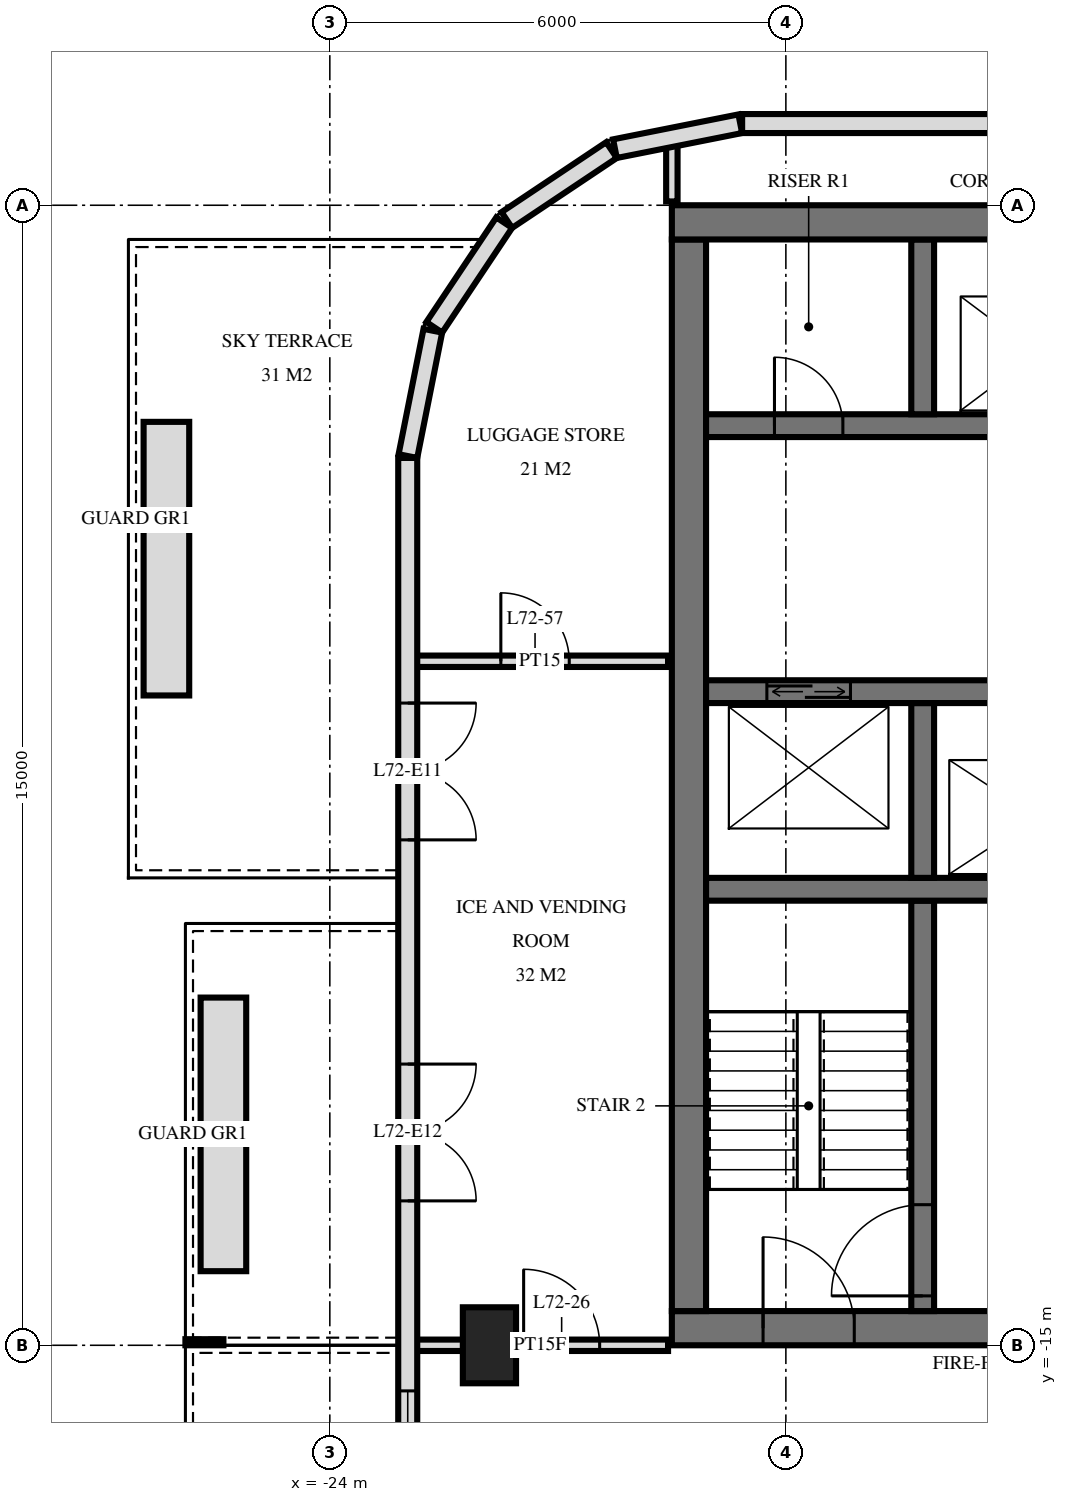
"""IFC4 building model, lengths in metres.
Left out: names, types, materials, properties, quantities, classifications, styles, units other than length and angle.
Written with IfcOpenShell. Run it as: python <this file> out.ifc"""

import sys

from ifc_helpers import new_model, si_unit, direction, frame, frame_2d, origin, origin_2d, place, context, subcontext, project, spatial, rectangle, extrude, element, fill, save


model = new_model("IFC4")
c1 = context("Model", 3, precision=1e-05, world=origin(), true_north=direction((0.0, 1.0)))
c2 = subcontext(c1, "Body", "Model", "MODEL_VIEW")
j1 = project(units=[si_unit("LENGTHUNIT", "METRE"), si_unit("PLANEANGLEUNIT", "RADIAN")], contexts=[c1])
p1 = place(None, origin())
s1 = spatial("IfcSite", under=j1, at=p1, CompositionType="ELEMENT")
p2 = place(p1, origin())
s2 = spatial("IfcBuilding", under=s1, at=p2, CompositionType="ELEMENT")
p3 = place(p2, frame((0.0, 0.0, 273.6)))
s3 = spatial("IfcBuildingStorey", under=s2, at=p3, CompositionType="ELEMENT", Elevation=273.6)
p4 = place(p3, frame((-21.9, -15.0, 0.0), z_axis=(0.0, 0.0, 1.0), x_axis=(0.0, 1.0, 0.0)))
e1 = element("IfcColumn", 1, at=p4, inside=s3, PredefinedType="COLUMN", context=c2, shape_type="SweptSolid", body=[
    extrude(rectangle(XDim=1.0, YDim=0.7, at=origin_2d()), origin(), (0.0, 0.0, 1.0), 3.5),
])
p5 = place(p3, frame((-19.5, -0.225, 0.0), z_axis=(0.0, 0.0, 1.0), x_axis=(1.0, 0.0, 0.0)))
e2 = element("IfcWall", 2, at=p5, inside=s3, PredefinedType="SHEAR", context=c2, shape_type="SweptSolid", body=[
    extrude(rectangle(XDim=9.5, YDim=0.45, at=frame_2d((4.75, 0.0))), origin(), (0.0, 0.0, 1.0), 3.5),
])
p6 = place(p3, frame((-19.5, -14.775, 0.0), z_axis=(0.0, 0.0, 1.0), x_axis=(1.0, 0.0, 0.0)))
e3 = element("IfcWall", 3, at=p6, inside=s3, PredefinedType="SHEAR", context=c2, shape_type="SweptSolid", body=[
    extrude(rectangle(XDim=9.5, YDim=0.45, at=frame_2d((4.75, 0.0))), origin(), (0.0, 0.0, 1.0), 3.5),
])
p7 = place(p6, frame((1.2, 0.0, 0.0)))
e4 = element("IfcOpeningElement", 4, at=p7, cuts=e3, PredefinedType="OPENING", context=c2, shape_type="SweptSolid", body=[
    extrude(rectangle(XDim=1.2, YDim=2.1, at=frame_2d((0.6, 1.05))), frame((0.0, 0.235, 0.0), z_axis=(0.0, -1.0, 0.0), x_axis=(1.0, 0.0, 0.0)), (0.0, 0.0, 1.0), 0.47),
])
p8 = place(p6, frame((4.25, 0.0, 0.0)))
e5 = element("IfcOpeningElement", 5, at=p8, cuts=e3, PredefinedType="OPENING", context=c2, shape_type="SweptSolid", body=[
    extrude(rectangle(XDim=1.1, YDim=2.1, at=frame_2d((0.55, 1.05))), frame((0.0, 0.235, 0.0), z_axis=(0.0, -1.0, 0.0), x_axis=(1.0, 0.0, 0.0)), (0.0, 0.0, 1.0), 0.47),
])
p9 = place(p3, frame((-19.275, -14.55, 0.0), z_axis=(0.0, 0.0, 1.0), x_axis=(0.0, 1.0, 0.0)))
e6 = element("IfcWall", 6, at=p9, inside=s3, PredefinedType="SHEAR", context=c2, shape_type="SweptSolid", body=[
    extrude(rectangle(XDim=14.1, YDim=0.45, at=frame_2d((7.05, 0.0))), origin(), (0.0, 0.0, 1.0), 3.5),
])
p10 = place(p3, frame((-19.05, -2.9, 0.0), z_axis=(0.0, 0.0, 1.0), x_axis=(1.0, 0.0, 0.0)))
e7 = element("IfcWall", 7, at=p10, inside=s3, PredefinedType="SHEAR", context=c2, shape_type="SweptSolid", body=[
    extrude(rectangle(XDim=8.7, YDim=0.3, at=frame_2d((4.35, 0.0))), origin(), (0.0, 0.0, 1.0), 3.5),
])
p11 = place(p10, frame((6.8, 0.0, 0.0)))
e8 = element("IfcOpeningElement", 8, at=p11, cuts=e7, PredefinedType="OPENING", context=c2, shape_type="SweptSolid", body=[
    extrude(rectangle(XDim=1.1, YDim=2.1, at=frame_2d((0.55, 1.05))), frame((0.0, 0.16, 0.0), z_axis=(0.0, -1.0, 0.0), x_axis=(1.0, 0.0, 0.0)), (0.0, 0.0, 1.0), 0.32),
])
p12 = place(p10, frame((3.8, 0.0, 0.0)))
e9 = element("IfcOpeningElement", 9, at=p12, cuts=e7, PredefinedType="OPENING", context=c2, shape_type="SweptSolid", body=[
    extrude(rectangle(XDim=1.1, YDim=2.1, at=frame_2d((0.55, 1.05))), frame((0.0, 0.16, 0.0), z_axis=(0.0, -1.0, 0.0), x_axis=(1.0, 0.0, 0.0)), (0.0, 0.0, 1.0), 0.32),
])
p13 = place(p10, frame((0.9, 0.0, 0.0)))
e10 = element("IfcOpeningElement", 10, at=p13, cuts=e7, PredefinedType="OPENING", context=c2, shape_type="SweptSolid", body=[
    extrude(rectangle(XDim=0.9, YDim=2.1, at=frame_2d((0.45, 1.05))), frame((0.0, 0.16, 0.0), z_axis=(0.0, -1.0, 0.0), x_axis=(1.0, 0.0, 0.0)), (0.0, 0.0, 1.0), 0.32),
])
p14 = place(p3, frame((-19.05, -6.4, 0.0), z_axis=(0.0, 0.0, 1.0), x_axis=(1.0, 0.0, 0.0)))
e11 = element("IfcWall", 11, at=p14, inside=s3, PredefinedType="SHEAR", context=c2, shape_type="SweptSolid", body=[
    extrude(rectangle(XDim=8.7, YDim=0.3, at=frame_2d((4.35, 0.0))), origin(), (0.0, 0.0, 1.0), 3.5),
])
p15 = place(p14, frame((0.8, 0.0, 0.0)))
e12 = element("IfcOpeningElement", 12, at=p15, cuts=e11, PredefinedType="OPENING", context=c2, shape_type="SweptSolid", body=[
    extrude(rectangle(XDim=1.1, YDim=2.1, at=frame_2d((0.55, 1.05))), frame((0.0, 0.16, 0.0), z_axis=(0.0, -1.0, 0.0), x_axis=(1.0, 0.0, 0.0)), (0.0, 0.0, 1.0), 0.32),
])
p16 = place(p3, frame((-19.05, -9.0, 0.0), z_axis=(0.0, 0.0, 1.0), x_axis=(1.0, 0.0, 0.0)))
e13 = element("IfcWall", 13, at=p16, inside=s3, PredefinedType="SHEAR", context=c2, shape_type="SweptSolid", body=[
    extrude(rectangle(XDim=8.7, YDim=0.3, at=frame_2d((4.35, 0.0))), origin(), (0.0, 0.0, 1.0), 3.5),
])
p17 = place(p16, frame((3.8, 0.0, 0.0)))
e14 = element("IfcOpeningElement", 14, at=p17, cuts=e13, PredefinedType="OPENING", context=c2, shape_type="SweptSolid", body=[
    extrude(rectangle(XDim=1.1, YDim=2.1, at=frame_2d((0.55, 1.05))), frame((0.0, 0.16, 0.0), z_axis=(0.0, -1.0, 0.0), x_axis=(1.0, 0.0, 0.0)), (0.0, 0.0, 1.0), 0.32),
])
for number, where, z_axis, x_axis in (
    (15, (-16.2, -2.75, 0.0), (0.0, 0.0, 1.0), (0.0, 1.0, 0.0)),
    (16, (-16.2, -8.85, 0.0), (0.0, 0.0, 1.0), (0.0, 1.0, 0.0)),
):
    element("IfcWall", number, at=place(p3, frame(where, z_axis=z_axis, x_axis=x_axis)), inside=s3, PredefinedType="SHEAR", context=c2, shape_type="SweptSolid", body=[
        extrude(rectangle(XDim=2.3, YDim=0.3, at=frame_2d((1.15, 0.0))), origin(), (0.0, 0.0, 1.0), 3.5),
    ])
p18 = place(p3, frame((-16.2, -14.55, 0.0), z_axis=(0.0, 0.0, 1.0), x_axis=(0.0, 1.0, 0.0)))
e17 = element("IfcWall", 17, at=p18, inside=s3, PredefinedType="SHEAR", context=c2, shape_type="SweptSolid", body=[
    extrude(rectangle(XDim=5.4, YDim=0.3, at=frame_2d((2.7, 0.0))), origin(), (0.0, 0.0, 1.0), 3.5),
])
p19 = place(p18, frame((0.2, 0.0, 0.0)))
e18 = element("IfcOpeningElement", 18, at=p19, cuts=e17, PredefinedType="OPENING", context=c2, shape_type="SweptSolid", body=[
    extrude(rectangle(XDim=1.2, YDim=2.1, at=frame_2d((0.6, 1.05))), frame((0.0, 0.16, 0.0), z_axis=(0.0, -1.0, 0.0), x_axis=(1.0, 0.0, 0.0)), (0.0, 0.0, 1.0), 0.32),
])
p20 = place(p3, frame((18.575, 1.075, 0.0), z_axis=(0.0, 0.0, 1.0), x_axis=(-1.0, 0.0, 0.0)))
e19 = element("IfcWall", 19, at=p20, inside=s3, PredefinedType="SOLIDWALL", context=c2, shape_type="SweptSolid", body=[
    extrude(rectangle(XDim=37.151, YDim=0.25, at=frame_2d((18.575, 0.0))), origin(), (0.0, 0.0, 1.0), 3.22),
])
p21 = place(p20, frame((15.275, 0.0, 0.9)))
e20 = element("IfcOpeningElement", 20, at=p21, cuts=e19, PredefinedType="OPENING", context=c2, shape_type="SweptSolid", body=[
    extrude(rectangle(XDim=2.4, YDim=1.5, at=frame_2d((1.2, 0.75))), frame((0.0, 0.135, 0.0), z_axis=(0.0, -1.0, 0.0), x_axis=(1.0, 0.0, 0.0)), (0.0, 0.0, 1.0), 0.27),
])
p22 = place(p20, frame((21.275, 0.0, 0.9)))
e21 = element("IfcOpeningElement", 21, at=p22, cuts=e19, PredefinedType="OPENING", context=c2, shape_type="SweptSolid", body=[
    extrude(rectangle(XDim=2.4, YDim=1.5, at=frame_2d((1.2, 0.75))), frame((0.0, 0.135, 0.0), z_axis=(0.0, -1.0, 0.0), x_axis=(1.0, 0.0, 0.0)), (0.0, 0.0, 1.0), 0.27),
])
p23 = place(p20, frame((24.275, 0.0, 0.9)))
e22 = element("IfcOpeningElement", 22, at=p23, cuts=e19, PredefinedType="OPENING", context=c2, shape_type="SweptSolid", body=[
    extrude(rectangle(XDim=2.4, YDim=1.5, at=frame_2d((1.2, 0.75))), frame((0.0, 0.135, 0.0), z_axis=(0.0, -1.0, 0.0), x_axis=(1.0, 0.0, 0.0)), (0.0, 0.0, 1.0), 0.27),
])
p24 = place(p3, frame((-18.6, 1.073, 0.0), z_axis=(0.0, 0.0, 1.0), x_axis=(-0.980797896849, -0.195026884138, 0.0)))
e23 = element("IfcWall", 23, at=p24, inside=s3, PredefinedType="SOLIDWALL", context=c2, shape_type="SweptSolid", body=[
    extrude(rectangle(XDim=1.681, YDim=0.25, at=frame_2d((0.841, 0.0))), origin(), (0.0, 0.0, 1.0), 3.22),
])
for number, where, z_axis, x_axis in (
    (24, (-20.294, 0.726, 0.0), (0.0, 0.0, 1.0), (-0.831, -0.556, 0.0)),
    (25, (-21.706, -0.229, 0.0), (0.0, 0.0, 1.0), (-0.556, -0.831, 0.0)),
):
    element("IfcWall", number, at=place(p3, frame(where, z_axis=z_axis, x_axis=x_axis)), inside=s3, PredefinedType="SOLIDWALL", context=c2, shape_type="SweptSolid", body=[
        extrude(rectangle(XDim=1.656, YDim=0.25, at=frame_2d((0.828, 0.0))), origin(), (0.0, 0.0, 1.0), 3.22),
    ])
p25 = place(p3, frame((-22.645, -1.651, 0.0), z_axis=(0.0, 0.0, 1.0), x_axis=(-0.19513878023, -0.980775640221, 0.0)))
e26 = element("IfcWall", 26, at=p25, inside=s3, PredefinedType="SOLIDWALL", context=c2, shape_type="SweptSolid", body=[
    extrude(rectangle(XDim=1.681, YDim=0.25, at=frame_2d((0.841, 0.0))), origin(), (0.0, 0.0, 1.0), 3.22),
])
p26 = place(p3, frame((-22.975, -3.325, 0.0), z_axis=(0.0, 0.0, 1.0), x_axis=(0.0, -1.0, 0.0)))
e27 = element("IfcWall", 27, at=p26, inside=s3, PredefinedType="SOLIDWALL", context=c2, shape_type="SweptSolid", body=[
    extrude(rectangle(XDim=25.951, YDim=0.25, at=frame_2d((12.975, 0.0))), origin(), (0.0, 0.0, 1.0), 3.22),
])
p27 = place(p26, frame((3.225, 0.0, 0.0)))
e28 = element("IfcOpeningElement", 28, at=p27, cuts=e27, PredefinedType="OPENING", context=c2, shape_type="SweptSolid", body=[
    extrude(rectangle(XDim=1.8, YDim=2.4, at=frame_2d((0.9, 1.2))), frame((0.0, 0.135, 0.0), z_axis=(0.0, -1.0, 0.0), x_axis=(1.0, 0.0, 0.0)), (0.0, 0.0, 1.0), 0.27),
])
p28 = place(p26, frame((7.975, 0.0, 0.0)))
e29 = element("IfcOpeningElement", 29, at=p28, cuts=e27, PredefinedType="OPENING", context=c2, shape_type="SweptSolid", body=[
    extrude(rectangle(XDim=1.8, YDim=2.4, at=frame_2d((0.9, 1.2))), frame((0.0, 0.135, 0.0), z_axis=(0.0, -1.0, 0.0), x_axis=(1.0, 0.0, 0.0)), (0.0, 0.0, 1.0), 0.27),
])
p29 = place(p26, frame((12.275, 0.0, 0.9)))
e30 = element("IfcOpeningElement", 30, at=p29, cuts=e27, PredefinedType="OPENING", context=c2, shape_type="SweptSolid", body=[
    extrude(rectangle(XDim=1.2, YDim=1.5, at=frame_2d((0.6, 0.75))), frame((0.0, 0.135, 0.0), z_axis=(0.0, -1.0, 0.0), x_axis=(1.0, 0.0, 0.0)), (0.0, 0.0, 1.0), 0.27),
])
p30 = place(p26, frame((18.175, 0.0, 0.0)))
e31 = element("IfcOpeningElement", 31, at=p30, cuts=e27, PredefinedType="OPENING", context=c2, shape_type="SweptSolid", body=[
    extrude(rectangle(XDim=1.8, YDim=2.4, at=frame_2d((0.9, 1.2))), frame((0.0, 0.135, 0.0), z_axis=(0.0, -1.0, 0.0), x_axis=(1.0, 0.0, 0.0)), (0.0, 0.0, 1.0), 0.27),
])
p31 = place(p26, frame((21.075, 0.0, 0.0)))
e32 = element("IfcOpeningElement", 32, at=p31, cuts=e27, PredefinedType="OPENING", context=c2, shape_type="SweptSolid", body=[
    extrude(rectangle(XDim=1.8, YDim=2.4, at=frame_2d((0.9, 1.2))), frame((0.0, 0.135, 0.0), z_axis=(0.0, -1.0, 0.0), x_axis=(1.0, 0.0, 0.0)), (0.0, 0.0, 1.0), 0.27),
])
p32 = place(p26, frame((23.825, 0.0, 0.9)))
e33 = element("IfcOpeningElement", 33, at=p32, cuts=e27, PredefinedType="OPENING", context=c2, shape_type="SweptSolid", body=[
    extrude(rectangle(XDim=1.8, YDim=1.5, at=frame_2d((0.9, 0.75))), frame((0.0, 0.135, 0.0), z_axis=(0.0, -1.0, 0.0), x_axis=(1.0, 0.0, 0.0)), (0.0, 0.0, 1.0), 0.27),
])
for number, where, z_axis, x_axis in (
    (34, (-25.4, -14.025, 0.0), (0.0, 0.0, 1.0), (0.0, 1.0, 0.0)),
    (35, (-26.15, -6.45, 0.0), (0.0, 0.0, 1.0), (0.0, 1.0, 0.0)),
):
    element("IfcWall", number, at=place(p3, frame(where, z_axis=z_axis, x_axis=x_axis)), inside=s3, PredefinedType="USERDEFINED", context=c2, shape_type="SweptSolid", body=[
        extrude(rectangle(XDim=3.6, YDim=0.6, at=frame_2d((1.8, 0.0))), origin(), (0.0, 0.0, 1.0), 0.65),
    ])
p33 = place(p3, frame((-19.5, 0.05, 0.0), z_axis=(0.0, 0.0, 1.0), x_axis=(0.0, 1.0, 0.0)))
e36 = element("IfcWall", 36, at=p33, inside=s3, PredefinedType="PARTITIONING", context=c2, shape_type="SweptSolid", body=[
    extrude(rectangle(XDim=0.787, YDim=0.15, at=frame_2d((0.394, 0.0))), origin(), (0.0, 0.0, 1.0), 3.22),
])
p34 = place(p3, frame((-22.92, -15.0, 0.0), z_axis=(0.0, 0.0, 1.0), x_axis=(1.0, 0.0, 0.0)))
e37 = element("IfcWall", 37, at=p34, inside=s3, PredefinedType="PARTITIONING", context=c2, shape_type="SweptSolid", body=[
    extrude(rectangle(XDim=3.37, YDim=0.15, at=frame_2d((1.685, 0.0))), origin(), (0.0, 0.0, 1.0), 3.22),
])
p35 = place(p34, frame((1.47, 0.0, 0.0)))
e38 = element("IfcOpeningElement", 38, at=p35, cuts=e37, PredefinedType="OPENING", context=c2, shape_type="SweptSolid", body=[
    extrude(rectangle(XDim=1.0, YDim=2.1, at=frame_2d((0.5, 1.05))), frame((0.0, 0.085, 0.0), z_axis=(0.0, -1.0, 0.0), x_axis=(1.0, 0.0, 0.0)), (0.0, 0.0, 1.0), 0.17),
])
p36 = place(p3, frame((-22.92, -6.0, 0.0), z_axis=(0.0, 0.0, 1.0), x_axis=(1.0, 0.0, 0.0)))
e39 = element("IfcWall", 39, at=p36, inside=s3, PredefinedType="PARTITIONING", context=c2, shape_type="SweptSolid", body=[
    extrude(rectangle(XDim=3.37, YDim=0.15, at=frame_2d((1.685, 0.0))), origin(), (0.0, 0.0, 1.0), 3.22),
])
p37 = place(p36, frame((1.17, 0.0, 0.0)))
e40 = element("IfcOpeningElement", 40, at=p37, cuts=e39, PredefinedType="OPENING", context=c2, shape_type="SweptSolid", body=[
    extrude(rectangle(XDim=0.9, YDim=2.1, at=frame_2d((0.45, 1.05))), frame((0.0, 0.085, 0.0), z_axis=(0.0, -1.0, 0.0), x_axis=(1.0, 0.0, 0.0)), (0.0, 0.0, 1.0), 0.17),
])
p38 = place(p27, origin())
e41 = element("IfcDoor", 41, at=p38, inside=s3, OperationType="DOUBLE_DOOR_SINGLE_SWING", PredefinedType="DOOR", context=c2, shape_type="SweptSolid", body=[
    extrude(rectangle(XDim=1.8, YDim=2.4, at=frame_2d((0.9, 1.2))), frame((0.0, 0.025, 0.0), z_axis=(0.0, -1.0, 0.0), x_axis=(1.0, 0.0, 0.0)), (0.0, 0.0, 1.0), 0.05),
])
fill(e28, e41)
p39 = place(p28, origin())
e42 = element("IfcDoor", 42, at=p39, inside=s3, OperationType="DOUBLE_DOOR_SINGLE_SWING", PredefinedType="DOOR", context=c2, shape_type="SweptSolid", body=[
    extrude(rectangle(XDim=1.8, YDim=2.4, at=frame_2d((0.9, 1.2))), frame((0.0, 0.025, 0.0), z_axis=(0.0, -1.0, 0.0), x_axis=(1.0, 0.0, 0.0)), (0.0, 0.0, 1.0), 0.05),
])
fill(e29, e42)
p40 = place(p29, origin())
e43 = element("IfcWindow", 43, at=p40, inside=s3, PartitioningType="SINGLE_PANEL", PredefinedType="WINDOW", context=c2, shape_type="SweptSolid", body=[
    extrude(rectangle(XDim=1.2, YDim=1.5, at=frame_2d((0.6, 0.75))), frame((0.0, 0.03, 0.0), z_axis=(0.0, -1.0, 0.0), x_axis=(1.0, 0.0, 0.0)), (0.0, 0.0, 1.0), 0.06),
])
fill(e30, e43)
p41 = place(p15, origin())
e44 = element("IfcDoor", 44, at=p41, inside=s3, OperationType="DOUBLE_DOOR_SLIDING", PredefinedType="USERDEFINED", context=c2, shape_type="SweptSolid", body=[
    extrude(rectangle(XDim=1.1, YDim=2.1, at=frame_2d((0.55, 1.05))), frame((0.0, 0.025, 0.0), z_axis=(0.0, -1.0, 0.0), x_axis=(1.0, 0.0, 0.0)), (0.0, 0.0, 1.0), 0.05),
])
fill(e12, e44)
p42 = place(p7, origin())
e45 = element("IfcDoor", 45, at=p42, inside=s3, OperationType="SINGLE_SWING_RIGHT", PredefinedType="DOOR", context=c2, shape_type="SweptSolid", body=[
    extrude(rectangle(XDim=1.2, YDim=2.1, at=frame_2d((0.6, 1.05))), frame((0.0, 0.025, 0.0), z_axis=(0.0, -1.0, 0.0), x_axis=(1.0, 0.0, 0.0)), (0.0, 0.0, 1.0), 0.05),
])
fill(e4, e45)
p43 = place(p13, origin())
e46 = element("IfcDoor", 46, at=p43, inside=s3, OperationType="SINGLE_SWING_RIGHT", PredefinedType="DOOR", context=c2, shape_type="SweptSolid", body=[
    extrude(rectangle(XDim=0.9, YDim=2.1, at=frame_2d((0.45, 1.05))), frame((0.0, 0.025, 0.0), z_axis=(0.0, -1.0, 0.0), x_axis=(1.0, 0.0, 0.0)), (0.0, 0.0, 1.0), 0.05),
])
fill(e10, e46)
p44 = place(p19, origin())
e47 = element("IfcDoor", 47, at=p44, inside=s3, OperationType="SINGLE_SWING_RIGHT", PredefinedType="DOOR", context=c2, shape_type="SweptSolid", body=[
    extrude(rectangle(XDim=1.2, YDim=2.1, at=frame_2d((0.6, 1.05))), frame((0.0, 0.025, 0.0), z_axis=(0.0, -1.0, 0.0), x_axis=(1.0, 0.0, 0.0)), (0.0, 0.0, 1.0), 0.05),
])
fill(e18, e47)
p45 = place(p35, origin())
e48 = element("IfcDoor", 48, at=p45, inside=s3, OperationType="SINGLE_SWING_RIGHT", PredefinedType="DOOR", context=c2, shape_type="SweptSolid", body=[
    extrude(rectangle(XDim=1.0, YDim=2.1, at=frame_2d((0.5, 1.05))), frame((0.0, 0.025, 0.0), z_axis=(0.0, -1.0, 0.0), x_axis=(1.0, 0.0, 0.0)), (0.0, 0.0, 1.0), 0.05),
])
fill(e38, e48)
p46 = place(p37, origin())
e49 = element("IfcDoor", 49, at=p46, inside=s3, OperationType="SINGLE_SWING_RIGHT", PredefinedType="DOOR", context=c2, shape_type="SweptSolid", body=[
    extrude(rectangle(XDim=0.9, YDim=2.1, at=frame_2d((0.45, 1.05))), frame((0.0, 0.025, 0.0), z_axis=(0.0, -1.0, 0.0), x_axis=(1.0, 0.0, 0.0)), (0.0, 0.0, 1.0), 0.05),
])
fill(e40, e49)
save(model, sys.argv[1])
